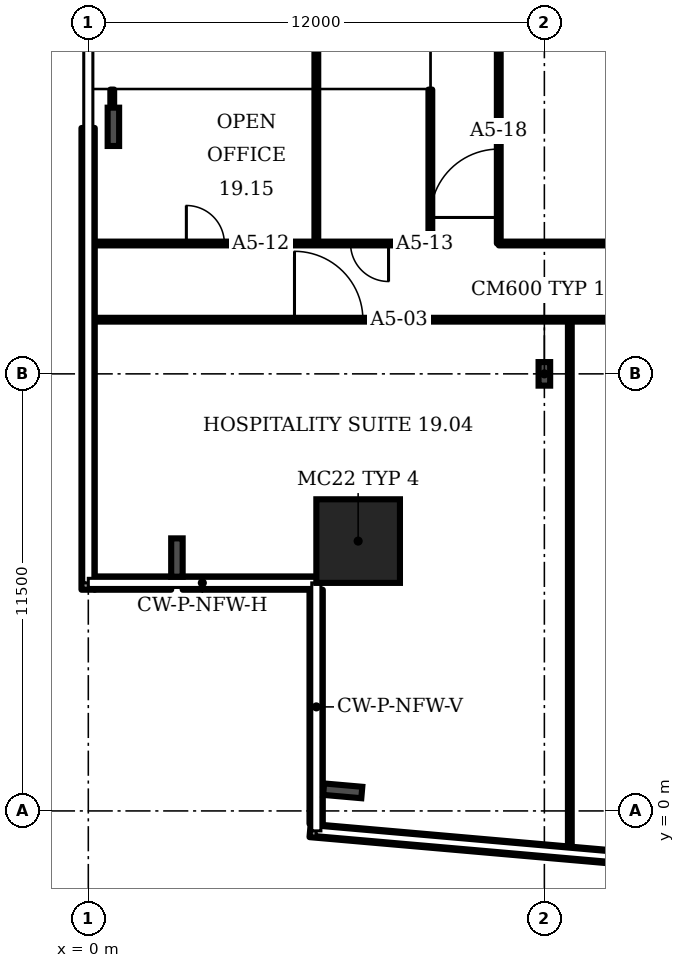
"""IFC4 building model, lengths in metres.
Left out: names, types, materials, properties, quantities, classifications, styles, units other than length and angle.
Written with IfcOpenShell. Run it as: python <this file> out.ifc"""

import sys

from ifc_helpers import new_model, si_unit, direction, frame, frame_2d, origin, origin_2d, place, context, subcontext, project, spatial, rectangle, i_section, extrude, element, fill, save


model = new_model("IFC4")
c1 = context("Model", 3, precision=1e-05, world=origin(), true_north=direction((0.0, 1.0)))
c2 = subcontext(c1, "Body", "Model", "MODEL_VIEW")
j1 = project(units=[si_unit("LENGTHUNIT", "METRE"), si_unit("PLANEANGLEUNIT", "RADIAN")], contexts=[c1])
p1 = place(None, origin())
s1 = spatial("IfcSite", under=j1, at=p1, CompositionType="ELEMENT")
p2 = place(p1, origin())
s2 = spatial("IfcBuilding", under=s1, at=p2, CompositionType="ELEMENT")
p3 = place(p2, frame((0.0, 0.0, 88.3)))
s3 = spatial("IfcBuildingStorey", under=s2, at=p3, CompositionType="ELEMENT", Elevation=88.3)
p4 = place(p3, frame((7.1, 7.1, 0.0), z_axis=(0.0, 0.0, 1.0), x_axis=(1.0, 0.0, 0.0)))
e1 = element("IfcColumn", 1, at=p4, inside=s3, PredefinedType="COLUMN", context=c2, shape_type="SweptSolid", body=[
    extrude(rectangle(XDim=2.2, YDim=2.2, at=origin_2d()), origin(), (0.0, 0.0, 1.0), 3.6),
])
for number, where, z_axis, x_axis in (
    (2, (6.694, 0.529, 0.0), (0.0, 0.0, 1.0), (-0.087, -0.996, 0.0)),
    (3, (0.66, 18.0, 0.0), (0.0, 0.0, 1.0), (-1.0, 0.0, 0.0)),
    (4, (2.332, 6.667, 0.0), (0.0, 0.0, 1.0), (-1.0, 0.0, 0.0)),
):
    element("IfcColumn", number, at=place(p3, frame(where, z_axis=z_axis, x_axis=x_axis)), inside=s3, PredefinedType="COLUMN", context=c2, shape_type="SweptSolid", body=[
        extrude(i_section(OverallWidth=0.302, OverallDepth=1.008, WebThickness=0.021, FlangeThickness=0.04, FilletRadius=0.03, at=origin_2d()), origin(), (0.0, 0.0, 1.0), 3.6),
    ])
p5 = place(p3, frame((12.0, 11.5, 0.0), z_axis=(0.0, 0.0, 1.0), x_axis=(1.0, 0.0, 0.0)))
e5 = element("IfcColumn", 5, at=p5, inside=s3, PredefinedType="COLUMN", context=c2, shape_type="SweptSolid", body=[
    extrude(i_section(OverallWidth=0.305, OverallDepth=0.62, WebThickness=0.021, FlangeThickness=0.04, FilletRadius=0.027, at=origin_2d()), origin(), (0.0, 0.0, 1.0), 3.6),
])
p6 = place(p3, frame((5.835, -0.516, 0.0), z_axis=(0.0, 0.0, 1.0), x_axis=(0.996192, -0.087142, 0.0)))
e6 = element("IfcWall", 6, at=p6, inside=s3, PredefinedType="SOLIDWALL", context=c2, shape_type="SweptSolid", body=[
    extrude(rectangle(XDim=11.607, YDim=0.35, at=frame_2d((5.804, 0.0))), origin(), (0.0, 0.0, 1.0), 1.0),
])
p7 = place(p3, frame((-0.005, 17.97, 0.0), z_axis=(0.0, 0.0, 1.0), x_axis=(0.0, -1.0, 0.0)))
e7 = element("IfcWall", 7, at=p7, inside=s3, PredefinedType="SOLIDWALL", context=c2, shape_type="SweptSolid", body=[
    extrude(rectangle(XDim=12.15, YDim=0.35, at=frame_2d((6.075, 0.0))), origin(), (0.0, 0.0, 1.0), 1.0),
])
p8 = place(p3, frame((0.17, 5.995, 0.0), z_axis=(0.0, 0.0, 1.0), x_axis=(1.0, 0.0, 0.0)))
e8 = element("IfcWall", 8, at=p8, inside=s3, PredefinedType="SOLIDWALL", context=c2, shape_type="SweptSolid", body=[
    extrude(rectangle(XDim=2.011, YDim=0.35, at=frame_2d((1.005, 0.0))), origin(), (0.0, 0.0, 1.0), 1.0),
])
p9 = place(p3, frame((2.483, 5.995, 0.0), z_axis=(0.0, 0.0, 1.0), x_axis=(1.0, 0.0, 0.0)))
e9 = element("IfcWall", 9, at=p9, inside=s3, PredefinedType="SOLIDWALL", context=c2, shape_type="SweptSolid", body=[
    extrude(rectangle(XDim=3.517, YDim=0.35, at=frame_2d((1.759, 0.0))), origin(), (0.0, 0.0, 1.0), 1.0),
])
p10 = place(p3, frame((5.995, 5.82, 0.0), z_axis=(0.0, 0.0, 1.0), x_axis=(0.0, -1.0, 0.0)))
e10 = element("IfcWall", 10, at=p10, inside=s3, PredefinedType="SOLIDWALL", context=c2, shape_type="SweptSolid", body=[
    extrude(rectangle(XDim=6.161, YDim=0.35, at=frame_2d((3.081, 0.0))), origin(), (0.0, 0.0, 1.0), 1.0),
])
p11 = place(p3, frame((0.02, 12.925, 0.0), z_axis=(0.0, 0.0, 1.0), x_axis=(1.0, 0.0, 0.0)))
e11 = element("IfcWall", 11, at=p11, inside=s3, PredefinedType="PARTITIONING", context=c2, shape_type="SweptSolid", body=[
    extrude(rectangle(XDim=43.48, YDim=0.1, at=frame_2d((21.74, 0.0))), origin(), (0.0, 0.0, 1.0), 3.15),
])
p12 = place(p11, frame((5.405, 0.0, 0.0)))
e12 = element("IfcOpeningElement", 12, at=p12, cuts=e11, PredefinedType="OPENING", context=c2, shape_type="SweptSolid", body=[
    extrude(rectangle(XDim=1.8, YDim=2.1, at=frame_2d((0.9, 1.05))), frame((0.0, 0.06, 0.0), z_axis=(0.0, -1.0, 0.0), x_axis=(1.0, 0.0, 0.0)), (0.0, 0.0, 1.0), 0.12),
])
p13 = place(p11, frame((15.475, 0.0, 0.0)))
e13 = element("IfcOpeningElement", 13, at=p13, cuts=e11, PredefinedType="OPENING", context=c2, shape_type="SweptSolid", body=[
    extrude(rectangle(XDim=1.0, YDim=2.1, at=frame_2d((0.5, 1.05))), frame((0.0, 0.06, 0.0), z_axis=(0.0, -1.0, 0.0), x_axis=(1.0, 0.0, 0.0)), (0.0, 0.0, 1.0), 0.12),
])
p14 = place(p11, frame((22.14, 0.0, 0.0)))
e14 = element("IfcOpeningElement", 14, at=p14, cuts=e11, PredefinedType="OPENING", context=c2, shape_type="SweptSolid", body=[
    extrude(rectangle(XDim=1.0, YDim=2.1, at=frame_2d((0.5, 1.05))), frame((0.0, 0.06, 0.0), z_axis=(0.0, -1.0, 0.0), x_axis=(1.0, 0.0, 0.0)), (0.0, 0.0, 1.0), 0.12),
])
p15 = place(p11, frame((31.805, 0.0, 0.0)))
e15 = element("IfcOpeningElement", 15, at=p15, cuts=e11, PredefinedType="OPENING", context=c2, shape_type="SweptSolid", body=[
    extrude(rectangle(XDim=1.8, YDim=2.1, at=frame_2d((0.9, 1.05))), frame((0.0, 0.06, 0.0), z_axis=(0.0, -1.0, 0.0), x_axis=(1.0, 0.0, 0.0)), (0.0, 0.0, 1.0), 0.12),
])
p16 = place(p3, frame((0.02, 14.93, 0.0), z_axis=(0.0, 0.0, 1.0), x_axis=(1.0, 0.0, 0.0)))
e16 = element("IfcWall", 16, at=p16, inside=s3, PredefinedType="PARTITIONING", context=c2, shape_type="SweptSolid", body=[
    extrude(rectangle(XDim=8.98, YDim=0.1, at=frame_2d((4.49, 0.0))), origin(), (0.0, 0.0, 1.0), 3.15),
])
p17 = place(p16, frame((2.56, 0.0, 0.0)))
e17 = element("IfcOpeningElement", 17, at=p17, cuts=e16, PredefinedType="OPENING", context=c2, shape_type="SweptSolid", body=[
    extrude(rectangle(XDim=1.0, YDim=2.1, at=frame_2d((0.5, 1.05))), frame((0.0, 0.06, 0.0), z_axis=(0.0, -1.0, 0.0), x_axis=(1.0, 0.0, 0.0)), (0.0, 0.0, 1.0), 0.12),
])
p18 = place(p16, frame((6.88, 0.0, 0.0)))
e18 = element("IfcOpeningElement", 18, at=p18, cuts=e16, PredefinedType="OPENING", context=c2, shape_type="SweptSolid", body=[
    extrude(rectangle(XDim=1.0, YDim=2.1, at=frame_2d((0.5, 1.05))), frame((0.0, 0.06, 0.0), z_axis=(0.0, -1.0, 0.0), x_axis=(1.0, 0.0, 0.0)), (0.0, 0.0, 1.0), 0.12),
])
p19 = place(p3, frame((0.63, 17.5, 0.0), z_axis=(0.0, 0.0, 1.0), x_axis=(0.0, 1.0, 0.0)))
e19 = element("IfcWall", 19, at=p19, inside=s3, PredefinedType="PARTITIONING", context=c2, shape_type="SweptSolid", body=[
    extrude(rectangle(XDim=1.48, YDim=0.1, at=frame_2d((0.74, 0.0))), origin(), (0.0, 0.0, 1.0), 2.53),
])
p20 = place(p3, frame((6.0, 14.93, 0.0), z_axis=(0.0, 0.0, 1.0), x_axis=(0.0, 1.0, 0.0)))
e20 = element("IfcWall", 20, at=p20, inside=s3, PredefinedType="PARTITIONING", context=c2, shape_type="SweptSolid", body=[
    extrude(rectangle(XDim=5.395, YDim=0.1, at=frame_2d((2.698, 0.0))), origin(), (0.0, 0.0, 1.0), 3.15),
])
p21 = place(p3, frame((9.0, 14.93, 0.0), z_axis=(0.0, 0.0, 1.0), x_axis=(0.0, 1.0, 0.0)))
e21 = element("IfcWall", 21, at=p21, inside=s3, PredefinedType="PARTITIONING", context=c2, shape_type="SweptSolid", body=[
    extrude(rectangle(XDim=4.05, YDim=0.1, at=frame_2d((2.025, 0.0))), origin(), (0.0, 0.0, 1.0), 3.15),
])
p22 = place(p3, frame((10.8, 14.93, 0.0), z_axis=(0.0, 0.0, 1.0), x_axis=(0.0, 1.0, 0.0)))
e22 = element("IfcWall", 22, at=p22, inside=s3, PredefinedType="PARTITIONING", context=c2, shape_type="SweptSolid", body=[
    extrude(rectangle(XDim=8.47, YDim=0.1, at=frame_2d((4.235, 0.0))), origin(), (0.0, 0.0, 1.0), 3.15),
])
p23 = place(p22, frame((0.685, 0.0, 0.0)))
e23 = element("IfcOpeningElement", 23, at=p23, cuts=e22, PredefinedType="OPENING", context=c2, shape_type="SweptSolid", body=[
    extrude(rectangle(XDim=1.8, YDim=2.1, at=frame_2d((0.9, 1.05))), frame((0.0, 0.06, 0.0), z_axis=(0.0, -1.0, 0.0), x_axis=(1.0, 0.0, 0.0)), (0.0, 0.0, 1.0), 0.12),
])
p24 = place(p3, frame((10.8, 14.93, 0.0), z_axis=(0.0, 0.0, 1.0), x_axis=(1.0, 0.0, 0.0)))
e24 = element("IfcWall", 24, at=p24, inside=s3, PredefinedType="PARTITIONING", context=c2, shape_type="SweptSolid", body=[
    extrude(rectangle(XDim=32.7, YDim=0.1, at=frame_2d((16.35, 0.0))), origin(), (0.0, 0.0, 1.0), 3.15),
])
p25 = place(p24, frame((7.6, 0.0, 0.0)))
e25 = element("IfcOpeningElement", 25, at=p25, cuts=e24, PredefinedType="OPENING", context=c2, shape_type="SweptSolid", body=[
    extrude(rectangle(XDim=1.0, YDim=2.1, at=frame_2d((0.5, 1.05))), frame((0.0, 0.06, 0.0), z_axis=(0.0, -1.0, 0.0), x_axis=(1.0, 0.0, 0.0)), (0.0, 0.0, 1.0), 0.12),
])
p26 = place(p3, frame((12.67, -1.088, 0.0), z_axis=(0.0, 0.0, 1.0), x_axis=(0.0, 1.0, 0.0)))
e26 = element("IfcWall", 26, at=p26, inside=s3, PredefinedType="PARTITIONING", context=c2, shape_type="SweptSolid", body=[
    extrude(rectangle(XDim=14.013, YDim=0.1, at=frame_2d((7.007, 0.0))), origin(), (0.0, 0.0, 1.0), 3.15),
])
p27 = place(p12, origin())
e27 = element("IfcDoor", 27, at=p27, inside=s3, OperationType="DOUBLE_DOOR_SINGLE_SWING", PredefinedType="DOOR", context=c2, shape_type="SweptSolid", body=[
    extrude(rectangle(XDim=1.8, YDim=2.1, at=frame_2d((0.9, 1.05))), frame((0.0, 0.025, 0.0), z_axis=(0.0, -1.0, 0.0), x_axis=(1.0, 0.0, 0.0)), (0.0, 0.0, 1.0), 0.05),
])
fill(e12, e27)
p28 = place(p17, origin())
e28 = element("IfcDoor", 28, at=p28, inside=s3, OperationType="SINGLE_SWING_LEFT", PredefinedType="DOOR", context=c2, shape_type="SweptSolid", body=[
    extrude(rectangle(XDim=1.0, YDim=2.1, at=frame_2d((0.5, 1.05))), frame((0.0, 0.025, 0.0), z_axis=(0.0, -1.0, 0.0), x_axis=(1.0, 0.0, 0.0)), (0.0, 0.0, 1.0), 0.05),
])
fill(e17, e28)
p29 = place(p18, origin())
e29 = element("IfcDoor", 29, at=p29, inside=s3, OperationType="SINGLE_SWING_RIGHT", PredefinedType="DOOR", context=c2, shape_type="SweptSolid", body=[
    extrude(rectangle(XDim=1.0, YDim=2.1, at=frame_2d((0.5, 1.05))), frame((0.0, 0.025, 0.0), z_axis=(0.0, -1.0, 0.0), x_axis=(1.0, 0.0, 0.0)), (0.0, 0.0, 1.0), 0.05),
])
fill(e18, e29)
p30 = place(p23, origin())
e30 = element("IfcDoor", 30, at=p30, inside=s3, OperationType="DOUBLE_DOOR_SINGLE_SWING", PredefinedType="DOOR", context=c2, shape_type="SweptSolid", body=[
    extrude(rectangle(XDim=1.8, YDim=2.1, at=frame_2d((0.9, 1.05))), frame((0.0, 0.025, 0.0), z_axis=(0.0, -1.0, 0.0), x_axis=(1.0, 0.0, 0.0)), (0.0, 0.0, 1.0), 0.05),
])
fill(e23, e30)
save(model, sys.argv[1])
